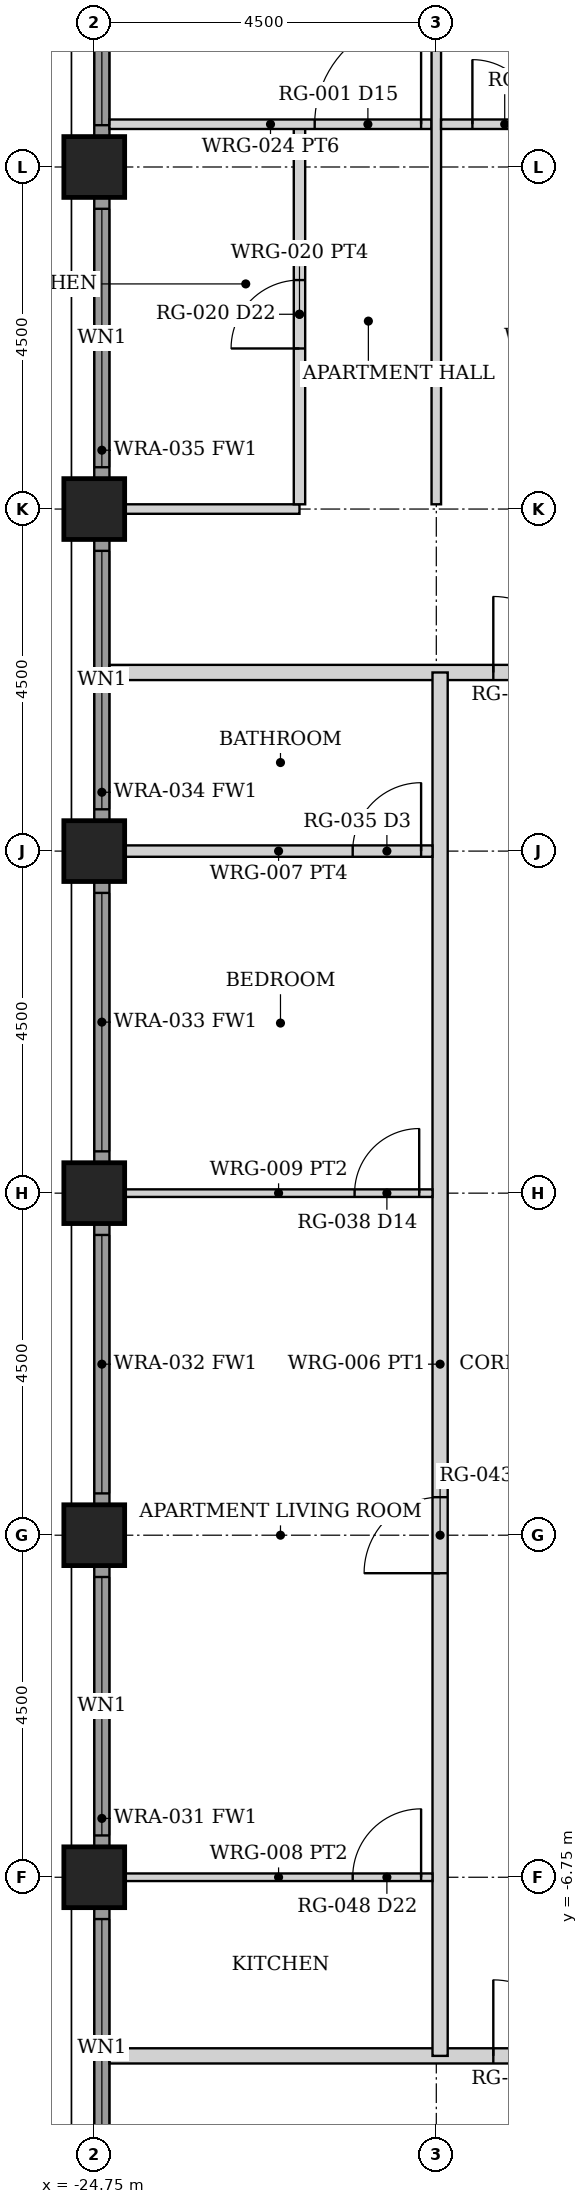
"""IFC4 building model, lengths in metres.
Left out: names, types, materials, properties, quantities, classifications, styles, units other than length and angle.
Written with IfcOpenShell. Run it as: python <this file> out.ifc"""

import sys

from ifc_helpers import new_model, si_unit, direction, frame, frame_2d, origin, origin_2d, place, context, subcontext, project, spatial, rectangle, hollow_rectangle, extrude, element, fill, save


model = new_model("IFC4")
c1 = context("Model", 3, precision=1e-05, world=origin(), true_north=direction((0.0, 1.0)))
c2 = subcontext(c1, "Body", "Model", "MODEL_VIEW")
j1 = project(units=[si_unit("LENGTHUNIT", "METRE"), si_unit("PLANEANGLEUNIT", "RADIAN")], contexts=[c1])
p1 = place(None, origin())
s1 = spatial("IfcSite", under=j1, at=p1, CompositionType="ELEMENT")
p2 = place(p1, origin())
s2 = spatial("IfcBuilding", under=s1, at=p2, CompositionType="ELEMENT")
p3 = place(p2, frame((0.0, 0.0, 89.5)))
s3 = spatial("IfcBuildingStorey", under=s2, at=p3, CompositionType="ELEMENT", Elevation=89.5)
for number, where, z_axis, x_axis in (
    (1, (-24.75, -6.75, 0.0), (0.0, 0.0, 1.0), (1.0, 0.0, 0.0)),
    (2, (-24.75, -2.25, 0.0), (0.0, 0.0, 1.0), (1.0, 0.0, 0.0)),
    (3, (-24.75, 2.25, 0.0), (0.0, 0.0, 1.0), (1.0, 0.0, 0.0)),
    (4, (-24.75, 6.75, 0.0), (0.0, 0.0, 1.0), (1.0, 0.0, 0.0)),
    (5, (-24.75, 11.25, 0.0), (0.0, 0.0, 1.0), (1.0, 0.0, 0.0)),
    (6, (-24.75, 15.75, 0.0), (0.0, 0.0, 1.0), (1.0, 0.0, 0.0)),
):
    element("IfcColumn", number, at=place(p3, frame(where, z_axis=z_axis, x_axis=x_axis)), inside=s3, PredefinedType="COLUMN", context=c2, shape_type="SweptSolid", body=[
        extrude(hollow_rectangle(XDim=0.8, YDim=0.8, WallThickness=0.06, at=origin_2d()), origin(), (0.0, 0.0, 1.0), 3.5),
    ])
p4 = place(p3, frame((-24.65, -10.845, 0.0), z_axis=(0.0, 0.0, 1.0), x_axis=(0.0, 1.0, 0.0)))
e7 = element("IfcWall", 7, at=p4, inside=s3, PredefinedType="SOLIDWALL", context=c2, shape_type="SweptSolid", body=[
    extrude(rectangle(XDim=3.69, YDim=0.2, at=frame_2d((1.845, 0.0))), origin(), (0.0, 0.0, 1.0), 2.379),
])
p5 = place(p4, frame((0.145, 0.0, 0.3)))
e8 = element("IfcOpeningElement", 8, at=p5, cuts=e7, PredefinedType="OPENING", context=c2, shape_type="SweptSolid", body=[
    extrude(rectangle(XDim=3.4, YDim=1.929, at=frame_2d((1.7, 0.964))), frame((0.0, 0.11, 0.0), z_axis=(0.0, -1.0, 0.0), x_axis=(1.0, 0.0, 0.0)), (0.0, 0.0, 1.0), 0.22),
])
p6 = place(p3, frame((-24.65, -6.345, 0.0), z_axis=(0.0, 0.0, 1.0), x_axis=(0.0, 1.0, 0.0)))
e9 = element("IfcWall", 9, at=p6, inside=s3, PredefinedType="SOLIDWALL", context=c2, shape_type="SweptSolid", body=[
    extrude(rectangle(XDim=3.69, YDim=0.2, at=frame_2d((1.845, 0.0))), origin(), (0.0, 0.0, 1.0), 2.379),
])
p7 = place(p6, frame((0.145, 0.0, 0.3)))
e10 = element("IfcOpeningElement", 10, at=p7, cuts=e9, PredefinedType="OPENING", context=c2, shape_type="SweptSolid", body=[
    extrude(rectangle(XDim=3.4, YDim=1.929, at=frame_2d((1.7, 0.964))), frame((0.0, 0.11, 0.0), z_axis=(0.0, -1.0, 0.0), x_axis=(1.0, 0.0, 0.0)), (0.0, 0.0, 1.0), 0.22),
])
p8 = place(p3, frame((-24.65, -1.845, 0.0), z_axis=(0.0, 0.0, 1.0), x_axis=(0.0, 1.0, 0.0)))
e11 = element("IfcWall", 11, at=p8, inside=s3, PredefinedType="SOLIDWALL", context=c2, shape_type="SweptSolid", body=[
    extrude(rectangle(XDim=3.69, YDim=0.2, at=frame_2d((1.845, 0.0))), origin(), (0.0, 0.0, 1.0), 2.379),
])
p9 = place(p8, frame((0.145, 0.0, 0.3)))
e12 = element("IfcOpeningElement", 12, at=p9, cuts=e11, PredefinedType="OPENING", context=c2, shape_type="SweptSolid", body=[
    extrude(rectangle(XDim=3.4, YDim=1.929, at=frame_2d((1.7, 0.964))), frame((0.0, 0.11, 0.0), z_axis=(0.0, -1.0, 0.0), x_axis=(1.0, 0.0, 0.0)), (0.0, 0.0, 1.0), 0.22),
])
p10 = place(p3, frame((-24.65, 2.655, 0.0), z_axis=(0.0, 0.0, 1.0), x_axis=(0.0, 1.0, 0.0)))
e13 = element("IfcWall", 13, at=p10, inside=s3, PredefinedType="SOLIDWALL", context=c2, shape_type="SweptSolid", body=[
    extrude(rectangle(XDim=3.69, YDim=0.2, at=frame_2d((1.845, 0.0))), origin(), (0.0, 0.0, 1.0), 2.379),
])
p11 = place(p10, frame((0.145, 0.0, 0.3)))
e14 = element("IfcOpeningElement", 14, at=p11, cuts=e13, PredefinedType="OPENING", context=c2, shape_type="SweptSolid", body=[
    extrude(rectangle(XDim=3.4, YDim=1.929, at=frame_2d((1.7, 0.964))), frame((0.0, 0.11, 0.0), z_axis=(0.0, -1.0, 0.0), x_axis=(1.0, 0.0, 0.0)), (0.0, 0.0, 1.0), 0.22),
])
p12 = place(p3, frame((-24.65, 7.155, 0.0), z_axis=(0.0, 0.0, 1.0), x_axis=(0.0, 1.0, 0.0)))
e15 = element("IfcWall", 15, at=p12, inside=s3, PredefinedType="SOLIDWALL", context=c2, shape_type="SweptSolid", body=[
    extrude(rectangle(XDim=3.69, YDim=0.2, at=frame_2d((1.845, 0.0))), origin(), (0.0, 0.0, 1.0), 2.379),
])
p13 = place(p12, frame((0.145, 0.0, 0.3)))
e16 = element("IfcOpeningElement", 16, at=p13, cuts=e15, PredefinedType="OPENING", context=c2, shape_type="SweptSolid", body=[
    extrude(rectangle(XDim=3.4, YDim=1.929, at=frame_2d((1.7, 0.964))), frame((0.0, 0.11, 0.0), z_axis=(0.0, -1.0, 0.0), x_axis=(1.0, 0.0, 0.0)), (0.0, 0.0, 1.0), 0.22),
])
p14 = place(p3, frame((-24.65, 11.655, 0.0), z_axis=(0.0, 0.0, 1.0), x_axis=(0.0, 1.0, 0.0)))
e17 = element("IfcWall", 17, at=p14, inside=s3, PredefinedType="SOLIDWALL", context=c2, shape_type="SweptSolid", body=[
    extrude(rectangle(XDim=3.69, YDim=0.2, at=frame_2d((1.845, 0.0))), origin(), (0.0, 0.0, 1.0), 2.379),
])
p15 = place(p14, frame((0.145, 0.0, 0.3)))
e18 = element("IfcOpeningElement", 18, at=p15, cuts=e17, PredefinedType="OPENING", context=c2, shape_type="SweptSolid", body=[
    extrude(rectangle(XDim=3.4, YDim=1.929, at=frame_2d((1.7, 0.964))), frame((0.0, 0.11, 0.0), z_axis=(0.0, -1.0, 0.0), x_axis=(1.0, 0.0, 0.0)), (0.0, 0.0, 1.0), 0.22),
])
p16 = place(p3, frame((-24.65, 16.155, 0.0), z_axis=(0.0, 0.0, 1.0), x_axis=(0.0, 1.0, 0.0)))
e19 = element("IfcWall", 19, at=p16, inside=s3, PredefinedType="SOLIDWALL", context=c2, shape_type="SweptSolid", body=[
    extrude(rectangle(XDim=3.69, YDim=0.2, at=frame_2d((1.845, 0.0))), origin(), (0.0, 0.0, 1.0), 2.379),
])
p17 = place(p16, frame((0.145, 0.0, 0.3)))
e20 = element("IfcOpeningElement", 20, at=p17, cuts=e19, PredefinedType="OPENING", context=c2, shape_type="SweptSolid", body=[
    extrude(rectangle(XDim=3.4, YDim=1.929, at=frame_2d((1.7, 0.964))), frame((0.0, 0.11, 0.0), z_axis=(0.0, -1.0, 0.0), x_axis=(1.0, 0.0, 0.0)), (0.0, 0.0, 1.0), 0.22),
])
p18 = place(p3, frame((-24.55, 9.1, 0.0), z_axis=(0.0, 0.0, 1.0), x_axis=(1.0, 0.0, 0.0)))
e21 = element("IfcWall", 21, at=p18, inside=s3, PredefinedType="PARTITIONING", context=c2, shape_type="SweptSolid", body=[
    extrude(rectangle(XDim=49.1, YDim=0.2, at=frame_2d((24.55, 0.0))), origin(), (0.0, 0.0, 1.0), 2.373),
])
p19 = place(p18, frame((5.05, 0.0, 0.0)))
e22 = element("IfcOpeningElement", 22, at=p19, cuts=e21, PredefinedType="OPENING", context=c2, shape_type="SweptSolid", body=[
    extrude(rectangle(XDim=1.0, YDim=2.3, at=frame_2d((0.5, 1.15))), frame((0.0, 0.11, 0.0), z_axis=(0.0, -1.0, 0.0), x_axis=(1.0, 0.0, 0.0)), (0.0, 0.0, 1.0), 0.22),
])
p20 = place(p18, frame((18.05, 0.0, 0.0)))
e23 = element("IfcOpeningElement", 23, at=p20, cuts=e21, PredefinedType="OPENING", context=c2, shape_type="SweptSolid", body=[
    extrude(rectangle(XDim=1.0, YDim=2.3, at=frame_2d((0.5, 1.15))), frame((0.0, 0.11, 0.0), z_axis=(0.0, -1.0, 0.0), x_axis=(1.0, 0.0, 0.0)), (0.0, 0.0, 1.0), 0.22),
])
p21 = place(p18, frame((43.05, 0.0, 0.0)))
e24 = element("IfcOpeningElement", 24, at=p21, cuts=e21, PredefinedType="OPENING", context=c2, shape_type="SweptSolid", body=[
    extrude(rectangle(XDim=1.0, YDim=2.3, at=frame_2d((0.5, 1.15))), frame((0.0, 0.11, 0.0), z_axis=(0.0, -1.0, 0.0), x_axis=(1.0, 0.0, 0.0)), (0.0, 0.0, 1.0), 0.22),
])
p22 = place(p3, frame((-24.55, -9.1, 0.0), z_axis=(0.0, 0.0, 1.0), x_axis=(1.0, 0.0, 0.0)))
e25 = element("IfcWall", 25, at=p22, inside=s3, PredefinedType="PARTITIONING", context=c2, shape_type="SweptSolid", body=[
    extrude(rectangle(XDim=49.1, YDim=0.2, at=frame_2d((24.55, 0.0))), origin(), (0.0, 0.0, 1.0), 2.373),
])
p23 = place(p22, frame((5.05, 0.0, 0.0)))
e26 = element("IfcOpeningElement", 26, at=p23, cuts=e25, PredefinedType="OPENING", context=c2, shape_type="SweptSolid", body=[
    extrude(rectangle(XDim=1.0, YDim=2.3, at=frame_2d((0.5, 1.15))), frame((0.0, 0.11, 0.0), z_axis=(0.0, -1.0, 0.0), x_axis=(1.0, 0.0, 0.0)), (0.0, 0.0, 1.0), 0.22),
])
p24 = place(p22, frame((18.05, 0.0, 0.0)))
e27 = element("IfcOpeningElement", 27, at=p24, cuts=e25, PredefinedType="OPENING", context=c2, shape_type="SweptSolid", body=[
    extrude(rectangle(XDim=1.0, YDim=2.3, at=frame_2d((0.5, 1.15))), frame((0.0, 0.11, 0.0), z_axis=(0.0, -1.0, 0.0), x_axis=(1.0, 0.0, 0.0)), (0.0, 0.0, 1.0), 0.22),
])
p25 = place(p22, frame((43.05, 0.0, 0.0)))
e28 = element("IfcOpeningElement", 28, at=p25, cuts=e25, PredefinedType="OPENING", context=c2, shape_type="SweptSolid", body=[
    extrude(rectangle(XDim=1.0, YDim=2.3, at=frame_2d((0.5, 1.15))), frame((0.0, 0.11, 0.0), z_axis=(0.0, -1.0, 0.0), x_axis=(1.0, 0.0, 0.0)), (0.0, 0.0, 1.0), 0.22),
])
p26 = place(p3, frame((-20.2, -9.1, 0.0), z_axis=(0.0, 0.0, 1.0), x_axis=(0.0, 1.0, 0.0)))
e29 = element("IfcWall", 29, at=p26, inside=s3, PredefinedType="PARTITIONING", context=c2, shape_type="SweptSolid", body=[
    extrude(rectangle(XDim=18.2, YDim=0.2, at=frame_2d((9.1, 0.0))), origin(), (0.0, 0.0, 1.0), 2.373),
])
p27 = place(p26, frame((6.35, 0.0, 0.0)))
e30 = element("IfcOpeningElement", 30, at=p27, cuts=e29, PredefinedType="OPENING", context=c2, shape_type="SweptSolid", body=[
    extrude(rectangle(XDim=1.0, YDim=2.3, at=frame_2d((0.5, 1.15))), frame((0.0, 0.11, 0.0), z_axis=(0.0, -1.0, 0.0), x_axis=(1.0, 0.0, 0.0)), (0.0, 0.0, 1.0), 0.22),
])
p28 = place(p3, frame((-24.35, 11.25, 0.0), z_axis=(0.0, 0.0, 1.0), x_axis=(1.0, 0.0, 0.0)))
e31 = element("IfcWall", 31, at=p28, inside=s3, PredefinedType="PARTITIONING", context=c2, shape_type="SweptSolid", body=[
    extrude(rectangle(XDim=2.3, YDim=0.125, at=frame_2d((1.15, 0.0))), origin(), (0.0, 0.0, 1.0), 2.373),
])
p29 = place(p3, frame((-22.05, 11.312, 0.0), z_axis=(0.0, 0.0, 1.0), x_axis=(0.0, 1.0, 0.0)))
e32 = element("IfcWall", 32, at=p29, inside=s3, PredefinedType="PARTITIONING", context=c2, shape_type="SweptSolid", body=[
    extrude(rectangle(XDim=5.0, YDim=0.15, at=frame_2d((2.5, 0.0))), origin(), (0.0, 0.0, 1.0), 2.373),
])
p30 = place(p29, frame((2.05, 0.0, 0.0)))
e33 = element("IfcOpeningElement", 33, at=p30, cuts=e32, PredefinedType="OPENING", context=c2, shape_type="SweptSolid", body=[
    extrude(rectangle(XDim=0.9, YDim=2.1, at=frame_2d((0.45, 1.05))), frame((0.0, 0.085, 0.0), z_axis=(0.0, -1.0, 0.0), x_axis=(1.0, 0.0, 0.0)), (0.0, 0.0, 1.0), 0.17),
])
p31 = place(p3, frame((-24.55, 16.312, 0.0), z_axis=(0.0, 0.0, 1.0), x_axis=(1.0, 0.0, 0.0)))
e34 = element("IfcWall", 34, at=p31, inside=s3, PredefinedType="PARTITIONING", context=c2, shape_type="SweptSolid", body=[
    extrude(rectangle(XDim=4.238, YDim=0.125, at=frame_2d((2.119, 0.0))), origin(), (0.0, 0.0, 1.0), 2.373),
])
p32 = place(p31, frame((2.7, 0.0, 0.0)))
e35 = element("IfcOpeningElement", 35, at=p32, cuts=e34, PredefinedType="OPENING", context=c2, shape_type="SweptSolid", body=[
    extrude(rectangle(XDim=1.4, YDim=2.1, at=frame_2d((0.7, 1.05))), frame((0.0, 0.073, 0.0), z_axis=(0.0, -1.0, 0.0), x_axis=(1.0, 0.0, 0.0)), (0.0, 0.0, 1.0), 0.145),
])
p33 = place(p3, frame((-20.25, 11.312, 0.0), z_axis=(0.0, 0.0, 1.0), x_axis=(0.0, 1.0, 0.0)))
e36 = element("IfcWall", 36, at=p33, inside=s3, PredefinedType="PARTITIONING", context=c2, shape_type="SweptSolid", body=[
    extrude(rectangle(XDim=13.038, YDim=0.125, at=frame_2d((6.519, 0.0))), origin(), (0.0, 0.0, 1.0), 2.373),
])
p34 = place(p3, frame((-20.188, 16.312, 0.0), z_axis=(0.0, 0.0, 1.0), x_axis=(1.0, 0.0, 0.0)))
e37 = element("IfcWall", 37, at=p34, inside=s3, PredefinedType="PARTITIONING", context=c2, shape_type="SweptSolid", body=[
    extrude(rectangle(XDim=4.375, YDim=0.125, at=frame_2d((2.188, 0.0))), origin(), (0.0, 0.0, 1.0), 2.373),
])
p35 = place(p34, frame((0.413, 0.0, 0.0)))
e38 = element("IfcOpeningElement", 38, at=p35, cuts=e37, PredefinedType="OPENING", context=c2, shape_type="SweptSolid", body=[
    extrude(rectangle(XDim=0.85, YDim=2.1, at=frame_2d((0.425, 1.05))), frame((0.0, 0.073, 0.0), z_axis=(0.0, -1.0, 0.0), x_axis=(1.0, 0.0, 0.0)), (0.0, 0.0, 1.0), 0.145),
])
p36 = place(p34, frame((2.694, 0.0, 0.0)))
e39 = element("IfcOpeningElement", 39, at=p36, cuts=e37, PredefinedType="OPENING", context=c2, shape_type="SweptSolid", body=[
    extrude(rectangle(XDim=0.8, YDim=2.1, at=frame_2d((0.4, 1.05))), frame((0.0, 0.073, 0.0), z_axis=(0.0, -1.0, 0.0), x_axis=(1.0, 0.0, 0.0)), (0.0, 0.0, 1.0), 0.145),
])
p37 = place(p3, frame((-24.35, -6.75, 0.0), z_axis=(0.0, 0.0, 1.0), x_axis=(1.0, 0.0, 0.0)))
e40 = element("IfcWall", 40, at=p37, inside=s3, PredefinedType="PARTITIONING", context=c2, shape_type="SweptSolid", body=[
    extrude(rectangle(XDim=4.05, YDim=0.1, at=frame_2d((2.025, 0.0))), origin(), (0.0, 0.0, 1.0), 2.373),
])
p38 = place(p37, frame((3.0, 0.0, 0.0)))
e41 = element("IfcOpeningElement", 41, at=p38, cuts=e40, PredefinedType="OPENING", context=c2, shape_type="SweptSolid", body=[
    extrude(rectangle(XDim=0.9, YDim=2.1, at=frame_2d((0.45, 1.05))), frame((0.0, 0.06, 0.0), z_axis=(0.0, -1.0, 0.0), x_axis=(1.0, 0.0, 0.0)), (0.0, 0.0, 1.0), 0.12),
])
p39 = place(p3, frame((-24.35, 2.25, 0.0), z_axis=(0.0, 0.0, 1.0), x_axis=(1.0, 0.0, 0.0)))
e42 = element("IfcWall", 42, at=p39, inside=s3, PredefinedType="PARTITIONING", context=c2, shape_type="SweptSolid", body=[
    extrude(rectangle(XDim=4.05, YDim=0.1, at=frame_2d((2.025, 0.0))), origin(), (0.0, 0.0, 1.0), 2.373),
])
p40 = place(p39, frame((3.025, 0.0, 0.0)))
e43 = element("IfcOpeningElement", 43, at=p40, cuts=e42, PredefinedType="OPENING", context=c2, shape_type="SweptSolid", body=[
    extrude(rectangle(XDim=0.85, YDim=2.1, at=frame_2d((0.425, 1.05))), frame((0.0, 0.06, 0.0), z_axis=(0.0, -1.0, 0.0), x_axis=(1.0, 0.0, 0.0)), (0.0, 0.0, 1.0), 0.12),
])
p41 = place(p3, frame((-24.35, 6.75, 0.0), z_axis=(0.0, 0.0, 1.0), x_axis=(1.0, 0.0, 0.0)))
e44 = element("IfcWall", 44, at=p41, inside=s3, PredefinedType="PARTITIONING", context=c2, shape_type="SweptSolid", body=[
    extrude(rectangle(XDim=4.05, YDim=0.15, at=frame_2d((2.025, 0.0))), origin(), (0.0, 0.0, 1.0), 2.373),
])
p42 = place(p41, frame((3.0, 0.0, 0.0)))
e45 = element("IfcOpeningElement", 45, at=p42, cuts=e44, PredefinedType="OPENING", context=c2, shape_type="SweptSolid", body=[
    extrude(rectangle(XDim=0.9, YDim=2.1, at=frame_2d((0.45, 1.05))), frame((0.0, 0.085, 0.0), z_axis=(0.0, -1.0, 0.0), x_axis=(1.0, 0.0, 0.0)), (0.0, 0.0, 1.0), 0.17),
])
p43 = place(p5, origin())
e46 = element("IfcWindow", 46, at=p43, inside=s3, PartitioningType="SINGLE_PANEL", PredefinedType="WINDOW", context=c2, shape_type="SweptSolid", body=[
    extrude(rectangle(XDim=3.4, YDim=1.929, at=frame_2d((1.7, 0.964))), frame((0.0, 0.03, 0.0), z_axis=(0.0, -1.0, 0.0), x_axis=(1.0, 0.0, 0.0)), (0.0, 0.0, 1.0), 0.06),
])
fill(e8, e46)
p44 = place(p7, origin())
e47 = element("IfcWindow", 47, at=p44, inside=s3, PartitioningType="SINGLE_PANEL", PredefinedType="WINDOW", context=c2, shape_type="SweptSolid", body=[
    extrude(rectangle(XDim=3.4, YDim=1.929, at=frame_2d((1.7, 0.964))), frame((0.0, 0.03, 0.0), z_axis=(0.0, -1.0, 0.0), x_axis=(1.0, 0.0, 0.0)), (0.0, 0.0, 1.0), 0.06),
])
fill(e10, e47)
p45 = place(p9, origin())
e48 = element("IfcWindow", 48, at=p45, inside=s3, PartitioningType="SINGLE_PANEL", PredefinedType="WINDOW", context=c2, shape_type="SweptSolid", body=[
    extrude(rectangle(XDim=3.4, YDim=1.929, at=frame_2d((1.7, 0.964))), frame((0.0, 0.03, 0.0), z_axis=(0.0, -1.0, 0.0), x_axis=(1.0, 0.0, 0.0)), (0.0, 0.0, 1.0), 0.06),
])
fill(e12, e48)
p46 = place(p11, origin())
e49 = element("IfcWindow", 49, at=p46, inside=s3, PartitioningType="SINGLE_PANEL", PredefinedType="WINDOW", context=c2, shape_type="SweptSolid", body=[
    extrude(rectangle(XDim=3.4, YDim=1.929, at=frame_2d((1.7, 0.964))), frame((0.0, 0.03, 0.0), z_axis=(0.0, -1.0, 0.0), x_axis=(1.0, 0.0, 0.0)), (0.0, 0.0, 1.0), 0.06),
])
fill(e14, e49)
p47 = place(p13, origin())
e50 = element("IfcWindow", 50, at=p47, inside=s3, PartitioningType="SINGLE_PANEL", PredefinedType="WINDOW", context=c2, shape_type="SweptSolid", body=[
    extrude(rectangle(XDim=3.4, YDim=1.929, at=frame_2d((1.7, 0.964))), frame((0.0, 0.03, 0.0), z_axis=(0.0, -1.0, 0.0), x_axis=(1.0, 0.0, 0.0)), (0.0, 0.0, 1.0), 0.06),
])
fill(e16, e50)
p48 = place(p15, origin())
e51 = element("IfcWindow", 51, at=p48, inside=s3, PartitioningType="SINGLE_PANEL", PredefinedType="WINDOW", context=c2, shape_type="SweptSolid", body=[
    extrude(rectangle(XDim=3.4, YDim=1.929, at=frame_2d((1.7, 0.964))), frame((0.0, 0.03, 0.0), z_axis=(0.0, -1.0, 0.0), x_axis=(1.0, 0.0, 0.0)), (0.0, 0.0, 1.0), 0.06),
])
fill(e18, e51)
p49 = place(p17, origin())
e52 = element("IfcWindow", 52, at=p49, inside=s3, PartitioningType="SINGLE_PANEL", PredefinedType="WINDOW", context=c2, shape_type="SweptSolid", body=[
    extrude(rectangle(XDim=3.4, YDim=1.929, at=frame_2d((1.7, 0.964))), frame((0.0, 0.03, 0.0), z_axis=(0.0, -1.0, 0.0), x_axis=(1.0, 0.0, 0.0)), (0.0, 0.0, 1.0), 0.06),
])
fill(e20, e52)
p50 = place(p19, origin())
e53 = element("IfcDoor", 53, at=p50, inside=s3, OperationType="SINGLE_SWING_LEFT", PredefinedType="DOOR", context=c2, shape_type="SweptSolid", body=[
    extrude(rectangle(XDim=1.0, YDim=2.3, at=frame_2d((0.5, 1.15))), frame((0.0, 0.025, 0.0), z_axis=(0.0, -1.0, 0.0), x_axis=(1.0, 0.0, 0.0)), (0.0, 0.0, 1.0), 0.05),
])
fill(e22, e53)
p51 = place(p30, origin())
e54 = element("IfcDoor", 54, at=p51, inside=s3, OperationType="SINGLE_SWING_LEFT", PredefinedType="DOOR", context=c2, shape_type="SweptSolid", body=[
    extrude(rectangle(XDim=0.9, YDim=2.1, at=frame_2d((0.45, 1.05))), frame((0.0, 0.025, 0.0), z_axis=(0.0, -1.0, 0.0), x_axis=(1.0, 0.0, 0.0)), (0.0, 0.0, 1.0), 0.05),
])
fill(e33, e54)
p52 = place(p32, origin())
e55 = element("IfcDoor", 55, at=p52, inside=s3, OperationType="SINGLE_SWING_RIGHT", PredefinedType="DOOR", context=c2, shape_type="SweptSolid", body=[
    extrude(rectangle(XDim=1.4, YDim=2.1, at=frame_2d((0.7, 1.05))), frame((0.0, 0.025, 0.0), z_axis=(0.0, -1.0, 0.0), x_axis=(1.0, 0.0, 0.0)), (0.0, 0.0, 1.0), 0.05),
])
fill(e35, e55)
p53 = place(p35, origin())
e56 = element("IfcDoor", 56, at=p53, inside=s3, OperationType="SINGLE_SWING_LEFT", PredefinedType="DOOR", context=c2, shape_type="SweptSolid", body=[
    extrude(rectangle(XDim=0.85, YDim=2.1, at=frame_2d((0.425, 1.05))), frame((0.0, 0.025, 0.0), z_axis=(0.0, -1.0, 0.0), x_axis=(1.0, 0.0, 0.0)), (0.0, 0.0, 1.0), 0.05),
])
fill(e38, e56)
p54 = place(p23, origin())
e57 = element("IfcDoor", 57, at=p54, inside=s3, OperationType="SINGLE_SWING_LEFT", PredefinedType="DOOR", context=c2, shape_type="SweptSolid", body=[
    extrude(rectangle(XDim=1.0, YDim=2.3, at=frame_2d((0.5, 1.15))), frame((0.0, 0.025, 0.0), z_axis=(0.0, -1.0, 0.0), x_axis=(1.0, 0.0, 0.0)), (0.0, 0.0, 1.0), 0.05),
])
fill(e26, e57)
p55 = place(p38, origin())
e58 = element("IfcDoor", 58, at=p55, inside=s3, OperationType="SINGLE_SWING_RIGHT", PredefinedType="DOOR", context=c2, shape_type="SweptSolid", body=[
    extrude(rectangle(XDim=0.9, YDim=2.1, at=frame_2d((0.45, 1.05))), frame((0.0, 0.025, 0.0), z_axis=(0.0, -1.0, 0.0), x_axis=(1.0, 0.0, 0.0)), (0.0, 0.0, 1.0), 0.05),
])
fill(e41, e58)
p56 = place(p40, origin())
e59 = element("IfcDoor", 59, at=p56, inside=s3, OperationType="SINGLE_SWING_RIGHT", PredefinedType="DOOR", context=c2, shape_type="SweptSolid", body=[
    extrude(rectangle(XDim=0.85, YDim=2.1, at=frame_2d((0.425, 1.05))), frame((0.0, 0.025, 0.0), z_axis=(0.0, -1.0, 0.0), x_axis=(1.0, 0.0, 0.0)), (0.0, 0.0, 1.0), 0.05),
])
fill(e43, e59)
p57 = place(p42, origin())
e60 = element("IfcDoor", 60, at=p57, inside=s3, OperationType="SINGLE_SWING_RIGHT", PredefinedType="DOOR", context=c2, shape_type="SweptSolid", body=[
    extrude(rectangle(XDim=0.9, YDim=2.1, at=frame_2d((0.45, 1.05))), frame((0.0, 0.025, 0.0), z_axis=(0.0, -1.0, 0.0), x_axis=(1.0, 0.0, 0.0)), (0.0, 0.0, 1.0), 0.05),
])
fill(e45, e60)
p58 = place(p27, origin())
e61 = element("IfcDoor", 61, at=p58, inside=s3, OperationType="SINGLE_SWING_LEFT", PredefinedType="DOOR", context=c2, shape_type="SweptSolid", body=[
    extrude(rectangle(XDim=1.0, YDim=2.3, at=frame_2d((0.5, 1.15))), frame((0.0, 0.025, 0.0), z_axis=(0.0, -1.0, 0.0), x_axis=(1.0, 0.0, 0.0)), (0.0, 0.0, 1.0), 0.05),
])
fill(e30, e61)
save(model, sys.argv[1])
